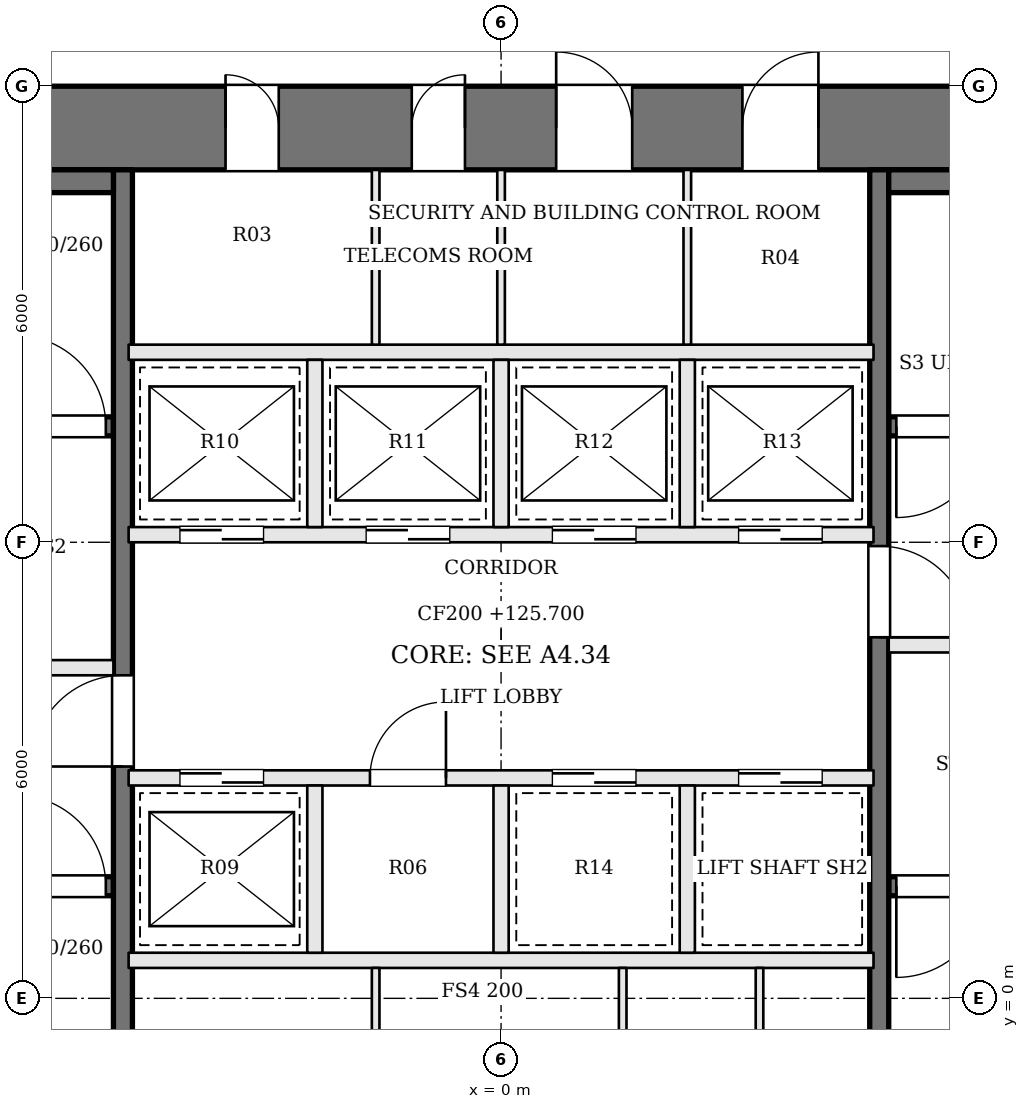
"""IFC4 building model, lengths in metres.
Left out: names, types, materials, properties, quantities, classifications, styles, units other than length and angle.
Written with IfcOpenShell. Run it as: python <this file> out.ifc"""

import sys

from ifc_helpers import new_model, si_unit, direction, frame, frame_2d, origin, place, context, subcontext, project, spatial, rectangle, extrude, element, fill, save


model = new_model("IFC4")
c1 = context("Model", 3, precision=1e-05, world=origin(), true_north=direction((0.0, 1.0)))
c2 = subcontext(c1, "Body", "Model", "MODEL_VIEW")
j1 = project(units=[si_unit("LENGTHUNIT", "METRE"), si_unit("PLANEANGLEUNIT", "RADIAN")], contexts=[c1])
p1 = place(None, origin())
s1 = spatial("IfcSite", under=j1, at=p1, CompositionType="ELEMENT")
p2 = place(p1, origin())
s2 = spatial("IfcBuilding", under=s1, at=p2, CompositionType="ELEMENT")
p3 = place(p2, frame((0.0, 0.0, 125.7)))
s3 = spatial("IfcBuildingStorey", under=s2, at=p3, CompositionType="ELEMENT", Elevation=125.7)
p4 = place(p3, frame((-13.0, 11.45, 0.0), z_axis=(0.0, 0.0, 1.0), x_axis=(1.0, 0.0, 0.0)))
e1 = element("IfcWall", 1, at=p4, inside=s3, PredefinedType="SHEAR", context=c2, shape_type="SweptSolid", body=[
    extrude(rectangle(XDim=26.0, YDim=1.1, at=frame_2d((13.0, 0.0))), origin(), (0.0, 0.0, 1.0), 4.8),
])
p5 = place(p4, frame((9.375, 0.0, 0.0)))
e2 = element("IfcOpeningElement", 2, at=p5, cuts=e1, PredefinedType="OPENING", context=c2, shape_type="SweptSolid", body=[
    extrude(rectangle(XDim=0.7, YDim=2.1, at=frame_2d((0.35, 1.05))), frame((0.0, 0.56, 0.0), z_axis=(0.0, -1.0, 0.0), x_axis=(1.0, 0.0, 0.0)), (0.0, 0.0, 1.0), 1.12),
])
p6 = place(p4, frame((11.825, 0.0, 0.0)))
e3 = element("IfcOpeningElement", 3, at=p6, cuts=e1, PredefinedType="OPENING", context=c2, shape_type="SweptSolid", body=[
    extrude(rectangle(XDim=0.7, YDim=2.1, at=frame_2d((0.35, 1.05))), frame((0.0, 0.56, 0.0), z_axis=(0.0, -1.0, 0.0), x_axis=(1.0, 0.0, 0.0)), (0.0, 0.0, 1.0), 1.12),
])
p7 = place(p4, frame((13.725, 0.0, 0.0)))
e4 = element("IfcOpeningElement", 4, at=p7, cuts=e1, PredefinedType="OPENING", context=c2, shape_type="SweptSolid", body=[
    extrude(rectangle(XDim=1.0, YDim=2.1, at=frame_2d((0.5, 1.05))), frame((0.0, 0.56, 0.0), z_axis=(0.0, -1.0, 0.0), x_axis=(1.0, 0.0, 0.0)), (0.0, 0.0, 1.0), 1.12),
])
p8 = place(p4, frame((16.175, 0.0, 0.0)))
e5 = element("IfcOpeningElement", 5, at=p8, cuts=e1, PredefinedType="OPENING", context=c2, shape_type="SweptSolid", body=[
    extrude(rectangle(XDim=1.0, YDim=2.1, at=frame_2d((0.5, 1.05))), frame((0.0, 0.56, 0.0), z_axis=(0.0, -1.0, 0.0), x_axis=(1.0, 0.0, 0.0)), (0.0, 0.0, 1.0), 1.12),
])
p9 = place(p3, frame((-11.9, 1.475, 0.0), z_axis=(0.0, 0.0, 1.0), x_axis=(1.0, 0.0, 0.0)))
e6 = element("IfcWall", 6, at=p9, inside=s3, PredefinedType="SOLIDWALL", context=c2, shape_type="SweptSolid", body=[
    extrude(rectangle(XDim=6.8, YDim=0.25, at=frame_2d((3.4, 0.0))), origin(), (0.0, 0.0, 1.0), 4.6),
])
p10 = place(p9, frame((5.5, 0.0, 0.0)))
e7 = element("IfcOpeningElement", 7, at=p10, cuts=e6, PredefinedType="OPENING", context=c2, shape_type="SweptSolid", body=[
    extrude(rectangle(XDim=1.2, YDim=2.1, at=frame_2d((0.6, 1.05))), frame((0.0, 0.135, 0.0), z_axis=(0.0, -1.0, 0.0), x_axis=(1.0, 0.0, 0.0)), (0.0, 0.0, 1.0), 0.27),
])
p11 = place(p3, frame((11.9, 7.525, 0.0), z_axis=(0.0, 0.0, 1.0), x_axis=(-1.0, 0.0, 0.0)))
e8 = element("IfcWall", 8, at=p11, inside=s3, PredefinedType="SOLIDWALL", context=c2, shape_type="SweptSolid", body=[
    extrude(rectangle(XDim=6.8, YDim=0.25, at=frame_2d((3.4, 0.0))), origin(), (0.0, 0.0, 1.0), 4.6),
])
p12 = place(p11, frame((5.5, 0.0, 0.0)))
e9 = element("IfcOpeningElement", 9, at=p12, cuts=e8, PredefinedType="OPENING", context=c2, shape_type="SweptSolid", body=[
    extrude(rectangle(XDim=1.2, YDim=2.1, at=frame_2d((0.6, 1.05))), frame((0.0, 0.135, 0.0), z_axis=(0.0, -1.0, 0.0), x_axis=(1.0, 0.0, 0.0)), (0.0, 0.0, 1.0), 0.27),
])
p13 = place(p3, frame((-11.9, 4.35, 0.0), z_axis=(0.0, 0.0, 1.0), x_axis=(1.0, 0.0, 0.0)))
e10 = element("IfcWall", 10, at=p13, inside=s3, PredefinedType="SOLIDWALL", context=c2, shape_type="SweptSolid", body=[
    extrude(rectangle(XDim=6.8, YDim=0.2, at=frame_2d((3.4, 0.0))), origin(), (0.0, 0.0, 1.0), 4.6),
])
p14 = place(p13, frame((4.1, 0.0, 0.0)))
e11 = element("IfcOpeningElement", 11, at=p14, cuts=e10, PredefinedType="OPENING", context=c2, shape_type="SweptSolid", body=[
    extrude(rectangle(XDim=1.2, YDim=2.1, at=frame_2d((0.6, 1.05))), frame((0.0, 0.11, 0.0), z_axis=(0.0, -1.0, 0.0), x_axis=(1.0, 0.0, 0.0)), (0.0, 0.0, 1.0), 0.22),
])
p15 = place(p13, frame((0.8, 0.0, 0.0)))
e12 = element("IfcOpeningElement", 12, at=p15, cuts=e10, PredefinedType="OPENING", context=c2, shape_type="SweptSolid", body=[
    extrude(rectangle(XDim=1.2, YDim=2.1, at=frame_2d((0.6, 1.05))), frame((0.0, 0.11, 0.0), z_axis=(0.0, -1.0, 0.0), x_axis=(1.0, 0.0, 0.0)), (0.0, 0.0, 1.0), 0.22),
])
p16 = place(p3, frame((11.9, 4.65, 0.0), z_axis=(0.0, 0.0, 1.0), x_axis=(-1.0, 0.0, 0.0)))
e13 = element("IfcWall", 13, at=p16, inside=s3, PredefinedType="SOLIDWALL", context=c2, shape_type="SweptSolid", body=[
    extrude(rectangle(XDim=6.8, YDim=0.2, at=frame_2d((3.4, 0.0))), origin(), (0.0, 0.0, 1.0), 4.6),
])
p17 = place(p16, frame((4.1, 0.0, 0.0)))
e14 = element("IfcOpeningElement", 14, at=p17, cuts=e13, PredefinedType="OPENING", context=c2, shape_type="SweptSolid", body=[
    extrude(rectangle(XDim=1.2, YDim=2.1, at=frame_2d((0.6, 1.05))), frame((0.0, 0.11, 0.0), z_axis=(0.0, -1.0, 0.0), x_axis=(1.0, 0.0, 0.0)), (0.0, 0.0, 1.0), 0.22),
])
p18 = place(p16, frame((0.8, 0.0, 0.0)))
e15 = element("IfcOpeningElement", 15, at=p18, cuts=e13, PredefinedType="OPENING", context=c2, shape_type="SweptSolid", body=[
    extrude(rectangle(XDim=1.2, YDim=2.1, at=frame_2d((0.6, 1.05))), frame((0.0, 0.11, 0.0), z_axis=(0.0, -1.0, 0.0), x_axis=(1.0, 0.0, 0.0)), (0.0, 0.0, 1.0), 0.22),
])
p19 = place(p3, frame((-11.9, 7.525, 0.0), z_axis=(0.0, 0.0, 1.0), x_axis=(1.0, 0.0, 0.0)))
e16 = element("IfcWall", 16, at=p19, inside=s3, PredefinedType="SOLIDWALL", context=c2, shape_type="SweptSolid", body=[
    extrude(rectangle(XDim=6.8, YDim=0.25, at=frame_2d((3.4, 0.0))), origin(), (0.0, 0.0, 1.0), 4.6),
])
p20 = place(p19, frame((5.5, 0.0, 0.0)))
e17 = element("IfcOpeningElement", 17, at=p20, cuts=e16, PredefinedType="OPENING", context=c2, shape_type="SweptSolid", body=[
    extrude(rectangle(XDim=1.2, YDim=2.1, at=frame_2d((0.6, 1.05))), frame((0.0, 0.135, 0.0), z_axis=(0.0, -1.0, 0.0), x_axis=(1.0, 0.0, 0.0)), (0.0, 0.0, 1.0), 0.27),
])
p21 = place(p3, frame((11.9, 1.475, 0.0), z_axis=(0.0, 0.0, 1.0), x_axis=(-1.0, 0.0, 0.0)))
e18 = element("IfcWall", 18, at=p21, inside=s3, PredefinedType="SOLIDWALL", context=c2, shape_type="SweptSolid", body=[
    extrude(rectangle(XDim=6.8, YDim=0.25, at=frame_2d((3.4, 0.0))), origin(), (0.0, 0.0, 1.0), 4.6),
])
p22 = place(p21, frame((5.5, 0.0, 0.0)))
e19 = element("IfcOpeningElement", 19, at=p22, cuts=e18, PredefinedType="OPENING", context=c2, shape_type="SweptSolid", body=[
    extrude(rectangle(XDim=1.2, YDim=2.1, at=frame_2d((0.6, 1.05))), frame((0.0, 0.135, 0.0), z_axis=(0.0, -1.0, 0.0), x_axis=(1.0, 0.0, 0.0)), (0.0, 0.0, 1.0), 0.27),
])
p23 = place(p3, frame((-4.975, -1.9, 0.0), z_axis=(0.0, 0.0, 1.0), x_axis=(0.0, 1.0, 0.0)))
e20 = element("IfcWall", 20, at=p23, inside=s3, PredefinedType="SOLIDWALL", context=c2, shape_type="SweptSolid", body=[
    extrude(rectangle(XDim=12.8, YDim=0.25, at=frame_2d((6.4, 0.0))), origin(), (0.0, 0.0, 1.0), 4.6),
])
p24 = place(p23, frame((4.95, 0.0, 0.0)))
e21 = element("IfcOpeningElement", 21, at=p24, cuts=e20, PredefinedType="OPENING", context=c2, shape_type="SweptSolid", body=[
    extrude(rectangle(XDim=1.2, YDim=2.1, at=frame_2d((0.6, 1.05))), frame((0.0, 0.135, 0.0), z_axis=(0.0, -1.0, 0.0), x_axis=(1.0, 0.0, 0.0)), (0.0, 0.0, 1.0), 0.27),
])
p25 = place(p3, frame((4.975, 10.9, 0.0), z_axis=(0.0, 0.0, 1.0), x_axis=(0.0, -1.0, 0.0)))
e22 = element("IfcWall", 22, at=p25, inside=s3, PredefinedType="SOLIDWALL", context=c2, shape_type="SweptSolid", body=[
    extrude(rectangle(XDim=12.8, YDim=0.25, at=frame_2d((6.4, 0.0))), origin(), (0.0, 0.0, 1.0), 4.6),
])
p26 = place(p25, frame((4.95, 0.0, 0.0)))
e23 = element("IfcOpeningElement", 23, at=p26, cuts=e22, PredefinedType="OPENING", context=c2, shape_type="SweptSolid", body=[
    extrude(rectangle(XDim=1.2, YDim=2.1, at=frame_2d((0.6, 1.05))), frame((0.0, 0.135, 0.0), z_axis=(0.0, -1.0, 0.0), x_axis=(1.0, 0.0, 0.0)), (0.0, 0.0, 1.0), 0.27),
])
for number, where, z_axis, x_axis in (
    (24, (-11.9, 10.75, 0.0), (0.0, 0.0, 1.0), (1.0, 0.0, 0.0)),
    (25, (11.9, 10.75, 0.0), (0.0, 0.0, 1.0), (-1.0, 0.0, 0.0)),
):
    element("IfcWall", number, at=place(p3, frame(where, z_axis=z_axis, x_axis=x_axis)), inside=s3, PredefinedType="SOLIDWALL", context=c2, shape_type="SweptSolid", body=[
        extrude(rectangle(XDim=6.8, YDim=0.3, at=frame_2d((3.4, 0.0))), origin(), (0.0, 0.0, 1.0), 4.6),
    ])
p27 = place(p3, frame((-4.9, 0.5, 0.0), z_axis=(0.0, 0.0, 1.0), x_axis=(1.0, 0.0, 0.0)))
e26 = element("IfcWall", 26, at=p27, inside=s3, PredefinedType="SOLIDWALL", context=c2, shape_type="SweptSolid", body=[
    extrude(rectangle(XDim=9.8, YDim=0.2, at=frame_2d((4.9, 0.0))), origin(), (0.0, 0.0, 1.0), 4.6),
])
p28 = place(p3, frame((-4.9, 2.9, 0.0), z_axis=(0.0, 0.0, 1.0), x_axis=(1.0, 0.0, 0.0)))
e27 = element("IfcWall", 27, at=p28, inside=s3, PredefinedType="SOLIDWALL", context=c2, shape_type="SweptSolid", body=[
    extrude(rectangle(XDim=9.8, YDim=0.2, at=frame_2d((4.9, 0.0))), origin(), (0.0, 0.0, 1.0), 4.6),
])
p29 = place(p28, frame((0.675, 0.0, 0.0)))
e28 = element("IfcOpeningElement", 28, at=p29, cuts=e27, PredefinedType="OPENING", context=c2, shape_type="SweptSolid", body=[
    extrude(rectangle(XDim=1.1, YDim=2.1, at=frame_2d((0.55, 1.05))), frame((0.0, 0.11, 0.0), z_axis=(0.0, -1.0, 0.0), x_axis=(1.0, 0.0, 0.0)), (0.0, 0.0, 1.0), 0.22),
])
p30 = place(p28, frame((3.175, 0.0, 0.0)))
e29 = element("IfcOpeningElement", 29, at=p30, cuts=e27, PredefinedType="OPENING", context=c2, shape_type="SweptSolid", body=[
    extrude(rectangle(XDim=1.0, YDim=2.1, at=frame_2d((0.5, 1.05))), frame((0.0, 0.11, 0.0), z_axis=(0.0, -1.0, 0.0), x_axis=(1.0, 0.0, 0.0)), (0.0, 0.0, 1.0), 0.22),
])
p31 = place(p28, frame((5.575, 0.0, 0.0)))
e30 = element("IfcOpeningElement", 30, at=p31, cuts=e27, PredefinedType="OPENING", context=c2, shape_type="SweptSolid", body=[
    extrude(rectangle(XDim=1.1, YDim=2.1, at=frame_2d((0.55, 1.05))), frame((0.0, 0.11, 0.0), z_axis=(0.0, -1.0, 0.0), x_axis=(1.0, 0.0, 0.0)), (0.0, 0.0, 1.0), 0.22),
])
p32 = place(p28, frame((8.025, 0.0, 0.0)))
e31 = element("IfcOpeningElement", 31, at=p32, cuts=e27, PredefinedType="OPENING", context=c2, shape_type="SweptSolid", body=[
    extrude(rectangle(XDim=1.1, YDim=2.1, at=frame_2d((0.55, 1.05))), frame((0.0, 0.11, 0.0), z_axis=(0.0, -1.0, 0.0), x_axis=(1.0, 0.0, 0.0)), (0.0, 0.0, 1.0), 0.22),
])
p33 = place(p3, frame((-4.9, 6.1, 0.0), z_axis=(0.0, 0.0, 1.0), x_axis=(1.0, 0.0, 0.0)))
e32 = element("IfcWall", 32, at=p33, inside=s3, PredefinedType="SOLIDWALL", context=c2, shape_type="SweptSolid", body=[
    extrude(rectangle(XDim=9.8, YDim=0.2, at=frame_2d((4.9, 0.0))), origin(), (0.0, 0.0, 1.0), 4.6),
])
p34 = place(p33, frame((0.675, 0.0, 0.0)))
e33 = element("IfcOpeningElement", 33, at=p34, cuts=e32, PredefinedType="OPENING", context=c2, shape_type="SweptSolid", body=[
    extrude(rectangle(XDim=1.1, YDim=2.1, at=frame_2d((0.55, 1.05))), frame((0.0, 0.11, 0.0), z_axis=(0.0, -1.0, 0.0), x_axis=(1.0, 0.0, 0.0)), (0.0, 0.0, 1.0), 0.22),
])
p35 = place(p33, frame((3.125, 0.0, 0.0)))
e34 = element("IfcOpeningElement", 34, at=p35, cuts=e32, PredefinedType="OPENING", context=c2, shape_type="SweptSolid", body=[
    extrude(rectangle(XDim=1.1, YDim=2.1, at=frame_2d((0.55, 1.05))), frame((0.0, 0.11, 0.0), z_axis=(0.0, -1.0, 0.0), x_axis=(1.0, 0.0, 0.0)), (0.0, 0.0, 1.0), 0.22),
])
p36 = place(p33, frame((5.575, 0.0, 0.0)))
e35 = element("IfcOpeningElement", 35, at=p36, cuts=e32, PredefinedType="OPENING", context=c2, shape_type="SweptSolid", body=[
    extrude(rectangle(XDim=1.1, YDim=2.1, at=frame_2d((0.55, 1.05))), frame((0.0, 0.11, 0.0), z_axis=(0.0, -1.0, 0.0), x_axis=(1.0, 0.0, 0.0)), (0.0, 0.0, 1.0), 0.22),
])
p37 = place(p33, frame((8.025, 0.0, 0.0)))
e36 = element("IfcOpeningElement", 36, at=p37, cuts=e32, PredefinedType="OPENING", context=c2, shape_type="SweptSolid", body=[
    extrude(rectangle(XDim=1.1, YDim=2.1, at=frame_2d((0.55, 1.05))), frame((0.0, 0.11, 0.0), z_axis=(0.0, -1.0, 0.0), x_axis=(1.0, 0.0, 0.0)), (0.0, 0.0, 1.0), 0.22),
])
p38 = place(p3, frame((-4.9, 8.5, 0.0), z_axis=(0.0, 0.0, 1.0), x_axis=(1.0, 0.0, 0.0)))
e37 = element("IfcWall", 37, at=p38, inside=s3, PredefinedType="SOLIDWALL", context=c2, shape_type="SweptSolid", body=[
    extrude(rectangle(XDim=9.8, YDim=0.2, at=frame_2d((4.9, 0.0))), origin(), (0.0, 0.0, 1.0), 4.6),
])
for number, where, z_axis, x_axis in (
    (38, (-2.45, 0.6, 0.0), (0.0, 0.0, 1.0), (0.0, 1.0, 0.0)),
    (39, (0.0, 0.6, 0.0), (0.0, 0.0, 1.0), (0.0, 1.0, 0.0)),
    (40, (2.45, 0.6, 0.0), (0.0, 0.0, 1.0), (0.0, 1.0, 0.0)),
    (41, (-2.45, 6.2, 0.0), (0.0, 0.0, 1.0), (0.0, 1.0, 0.0)),
    (42, (0.0, 6.2, 0.0), (0.0, 0.0, 1.0), (0.0, 1.0, 0.0)),
    (43, (2.45, 6.2, 0.0), (0.0, 0.0, 1.0), (0.0, 1.0, 0.0)),
):
    element("IfcWall", number, at=place(p3, frame(where, z_axis=z_axis, x_axis=x_axis)), inside=s3, PredefinedType="SOLIDWALL", context=c2, shape_type="SweptSolid", body=[
        extrude(rectangle(XDim=2.2, YDim=0.2, at=frame_2d((1.1, 0.0))), origin(), (0.0, 0.0, 1.0), 4.6),
    ])
for number, where, z_axis, x_axis in (
    (44, (-1.65, -1.9, 0.0), (0.0, 0.0, 1.0), (0.0, 1.0, 0.0)),
    (45, (1.6, -1.9, 0.0), (0.0, 0.0, 1.0), (0.0, 1.0, 0.0)),
    (46, (3.4, -1.9, 0.0), (0.0, 0.0, 1.0), (0.0, 1.0, 0.0)),
    (47, (-1.65, 8.6, 0.0), (0.0, 0.0, 1.0), (0.0, 1.0, 0.0)),
    (48, (0.0, 8.6, 0.0), (0.0, 0.0, 1.0), (0.0, 1.0, 0.0)),
    (49, (2.45, 8.6, 0.0), (0.0, 0.0, 1.0), (0.0, 1.0, 0.0)),
):
    element("IfcWall", number, at=place(p3, frame(where, z_axis=z_axis, x_axis=x_axis)), inside=s3, PredefinedType="PARTITIONING", context=c2, shape_type="SweptSolid", body=[
        extrude(rectangle(XDim=2.3, YDim=0.1, at=frame_2d((1.15, 0.0))), origin(), (0.0, 0.0, 1.0), 4.6),
    ])
p39 = place(p24, origin())
e50 = element("IfcDoor", 50, at=p39, inside=s3, OperationType="SINGLE_SWING_LEFT", PredefinedType="DOOR", context=c2, shape_type="SweptSolid", body=[
    extrude(rectangle(XDim=1.2, YDim=2.1, at=frame_2d((0.6, 1.05))), frame((0.0, 0.025, 0.0), z_axis=(0.0, -1.0, 0.0), x_axis=(1.0, 0.0, 0.0)), (0.0, 0.0, 1.0), 0.05),
])
fill(e21, e50)
p40 = place(p26, origin())
e51 = element("IfcDoor", 51, at=p40, inside=s3, OperationType="SINGLE_SWING_RIGHT", PredefinedType="DOOR", context=c2, shape_type="SweptSolid", body=[
    extrude(rectangle(XDim=1.2, YDim=2.1, at=frame_2d((0.6, 1.05))), frame((0.0, 0.025, 0.0), z_axis=(0.0, -1.0, 0.0), x_axis=(1.0, 0.0, 0.0)), (0.0, 0.0, 1.0), 0.05),
])
fill(e23, e51)
p41 = place(p10, origin())
e52 = element("IfcDoor", 52, at=p41, inside=s3, OperationType="SINGLE_SWING_LEFT", PredefinedType="DOOR", context=c2, shape_type="SweptSolid", body=[
    extrude(rectangle(XDim=1.2, YDim=2.1, at=frame_2d((0.6, 1.05))), frame((0.0, 0.025, 0.0), z_axis=(0.0, -1.0, 0.0), x_axis=(1.0, 0.0, 0.0)), (0.0, 0.0, 1.0), 0.05),
])
fill(e7, e52)
p42 = place(p12, origin())
e53 = element("IfcDoor", 53, at=p42, inside=s3, OperationType="SINGLE_SWING_RIGHT", PredefinedType="DOOR", context=c2, shape_type="SweptSolid", body=[
    extrude(rectangle(XDim=1.2, YDim=2.1, at=frame_2d((0.6, 1.05))), frame((0.0, 0.025, 0.0), z_axis=(0.0, -1.0, 0.0), x_axis=(1.0, 0.0, 0.0)), (0.0, 0.0, 1.0), 0.05),
])
fill(e9, e53)
p43 = place(p20, origin())
e54 = element("IfcDoor", 54, at=p43, inside=s3, OperationType="SINGLE_SWING_LEFT", PredefinedType="DOOR", context=c2, shape_type="SweptSolid", body=[
    extrude(rectangle(XDim=1.2, YDim=2.1, at=frame_2d((0.6, 1.05))), frame((0.0, 0.025, 0.0), z_axis=(0.0, -1.0, 0.0), x_axis=(1.0, 0.0, 0.0)), (0.0, 0.0, 1.0), 0.05),
])
fill(e17, e54)
p44 = place(p22, origin())
e55 = element("IfcDoor", 55, at=p44, inside=s3, OperationType="SINGLE_SWING_RIGHT", PredefinedType="DOOR", context=c2, shape_type="SweptSolid", body=[
    extrude(rectangle(XDim=1.2, YDim=2.1, at=frame_2d((0.6, 1.05))), frame((0.0, 0.025, 0.0), z_axis=(0.0, -1.0, 0.0), x_axis=(1.0, 0.0, 0.0)), (0.0, 0.0, 1.0), 0.05),
])
fill(e19, e55)
p45 = place(p29, origin())
e56 = element("IfcDoor", 56, at=p45, inside=s3, OperationType="SLIDING_TO_RIGHT", PredefinedType="DOOR", context=c2, shape_type="SweptSolid", body=[
    extrude(rectangle(XDim=1.1, YDim=2.1, at=frame_2d((0.55, 1.05))), frame((0.0, 0.025, 0.0), z_axis=(0.0, -1.0, 0.0), x_axis=(1.0, 0.0, 0.0)), (0.0, 0.0, 1.0), 0.05),
])
fill(e28, e56)
p46 = place(p30, origin())
e57 = element("IfcDoor", 57, at=p46, inside=s3, OperationType="SINGLE_SWING_RIGHT", PredefinedType="DOOR", context=c2, shape_type="SweptSolid", body=[
    extrude(rectangle(XDim=1.0, YDim=2.1, at=frame_2d((0.5, 1.05))), frame((0.0, 0.025, 0.0), z_axis=(0.0, -1.0, 0.0), x_axis=(1.0, 0.0, 0.0)), (0.0, 0.0, 1.0), 0.05),
])
fill(e29, e57)
p47 = place(p31, origin())
e58 = element("IfcDoor", 58, at=p47, inside=s3, OperationType="SLIDING_TO_LEFT", PredefinedType="DOOR", context=c2, shape_type="SweptSolid", body=[
    extrude(rectangle(XDim=1.1, YDim=2.1, at=frame_2d((0.55, 1.05))), frame((0.0, 0.025, 0.0), z_axis=(0.0, -1.0, 0.0), x_axis=(1.0, 0.0, 0.0)), (0.0, 0.0, 1.0), 0.05),
])
fill(e30, e58)
p48 = place(p32, origin())
e59 = element("IfcDoor", 59, at=p48, inside=s3, OperationType="SLIDING_TO_RIGHT", PredefinedType="DOOR", context=c2, shape_type="SweptSolid", body=[
    extrude(rectangle(XDim=1.1, YDim=2.1, at=frame_2d((0.55, 1.05))), frame((0.0, 0.025, 0.0), z_axis=(0.0, -1.0, 0.0), x_axis=(1.0, 0.0, 0.0)), (0.0, 0.0, 1.0), 0.05),
])
fill(e31, e59)
p49 = place(p34, origin())
e60 = element("IfcDoor", 60, at=p49, inside=s3, OperationType="SLIDING_TO_RIGHT", PredefinedType="DOOR", context=c2, shape_type="SweptSolid", body=[
    extrude(rectangle(XDim=1.1, YDim=2.1, at=frame_2d((0.55, 1.05))), frame((0.0, 0.025, 0.0), z_axis=(0.0, -1.0, 0.0), x_axis=(1.0, 0.0, 0.0)), (0.0, 0.0, 1.0), 0.05),
])
fill(e33, e60)
p50 = place(p35, origin())
e61 = element("IfcDoor", 61, at=p50, inside=s3, OperationType="SLIDING_TO_LEFT", PredefinedType="DOOR", context=c2, shape_type="SweptSolid", body=[
    extrude(rectangle(XDim=1.1, YDim=2.1, at=frame_2d((0.55, 1.05))), frame((0.0, 0.025, 0.0), z_axis=(0.0, -1.0, 0.0), x_axis=(1.0, 0.0, 0.0)), (0.0, 0.0, 1.0), 0.05),
])
fill(e34, e61)
p51 = place(p36, origin())
e62 = element("IfcDoor", 62, at=p51, inside=s3, OperationType="SLIDING_TO_RIGHT", PredefinedType="DOOR", context=c2, shape_type="SweptSolid", body=[
    extrude(rectangle(XDim=1.1, YDim=2.1, at=frame_2d((0.55, 1.05))), frame((0.0, 0.025, 0.0), z_axis=(0.0, -1.0, 0.0), x_axis=(1.0, 0.0, 0.0)), (0.0, 0.0, 1.0), 0.05),
])
fill(e35, e62)
p52 = place(p37, origin())
e63 = element("IfcDoor", 63, at=p52, inside=s3, OperationType="SLIDING_TO_LEFT", PredefinedType="DOOR", context=c2, shape_type="SweptSolid", body=[
    extrude(rectangle(XDim=1.1, YDim=2.1, at=frame_2d((0.55, 1.05))), frame((0.0, 0.025, 0.0), z_axis=(0.0, -1.0, 0.0), x_axis=(1.0, 0.0, 0.0)), (0.0, 0.0, 1.0), 0.05),
])
fill(e36, e63)
p53 = place(p5, origin())
e64 = element("IfcDoor", 64, at=p53, inside=s3, OperationType="SINGLE_SWING_LEFT", PredefinedType="DOOR", context=c2, shape_type="SweptSolid", body=[
    extrude(rectangle(XDim=0.7, YDim=2.1, at=frame_2d((0.35, 1.05))), frame((0.0, 0.025, 0.0), z_axis=(0.0, -1.0, 0.0), x_axis=(1.0, 0.0, 0.0)), (0.0, 0.0, 1.0), 0.05),
])
fill(e2, e64)
p54 = place(p6, origin())
e65 = element("IfcDoor", 65, at=p54, inside=s3, OperationType="SINGLE_SWING_RIGHT", PredefinedType="DOOR", context=c2, shape_type="SweptSolid", body=[
    extrude(rectangle(XDim=0.7, YDim=2.1, at=frame_2d((0.35, 1.05))), frame((0.0, 0.025, 0.0), z_axis=(0.0, -1.0, 0.0), x_axis=(1.0, 0.0, 0.0)), (0.0, 0.0, 1.0), 0.05),
])
fill(e3, e65)
p55 = place(p7, origin())
e66 = element("IfcDoor", 66, at=p55, inside=s3, OperationType="SINGLE_SWING_LEFT", PredefinedType="DOOR", context=c2, shape_type="SweptSolid", body=[
    extrude(rectangle(XDim=1.0, YDim=2.1, at=frame_2d((0.5, 1.05))), frame((0.0, 0.025, 0.0), z_axis=(0.0, -1.0, 0.0), x_axis=(1.0, 0.0, 0.0)), (0.0, 0.0, 1.0), 0.05),
])
fill(e4, e66)
p56 = place(p8, origin())
e67 = element("IfcDoor", 67, at=p56, inside=s3, OperationType="SINGLE_SWING_RIGHT", PredefinedType="DOOR", context=c2, shape_type="SweptSolid", body=[
    extrude(rectangle(XDim=1.0, YDim=2.1, at=frame_2d((0.5, 1.05))), frame((0.0, 0.025, 0.0), z_axis=(0.0, -1.0, 0.0), x_axis=(1.0, 0.0, 0.0)), (0.0, 0.0, 1.0), 0.05),
])
fill(e5, e67)
save(model, sys.argv[1])
